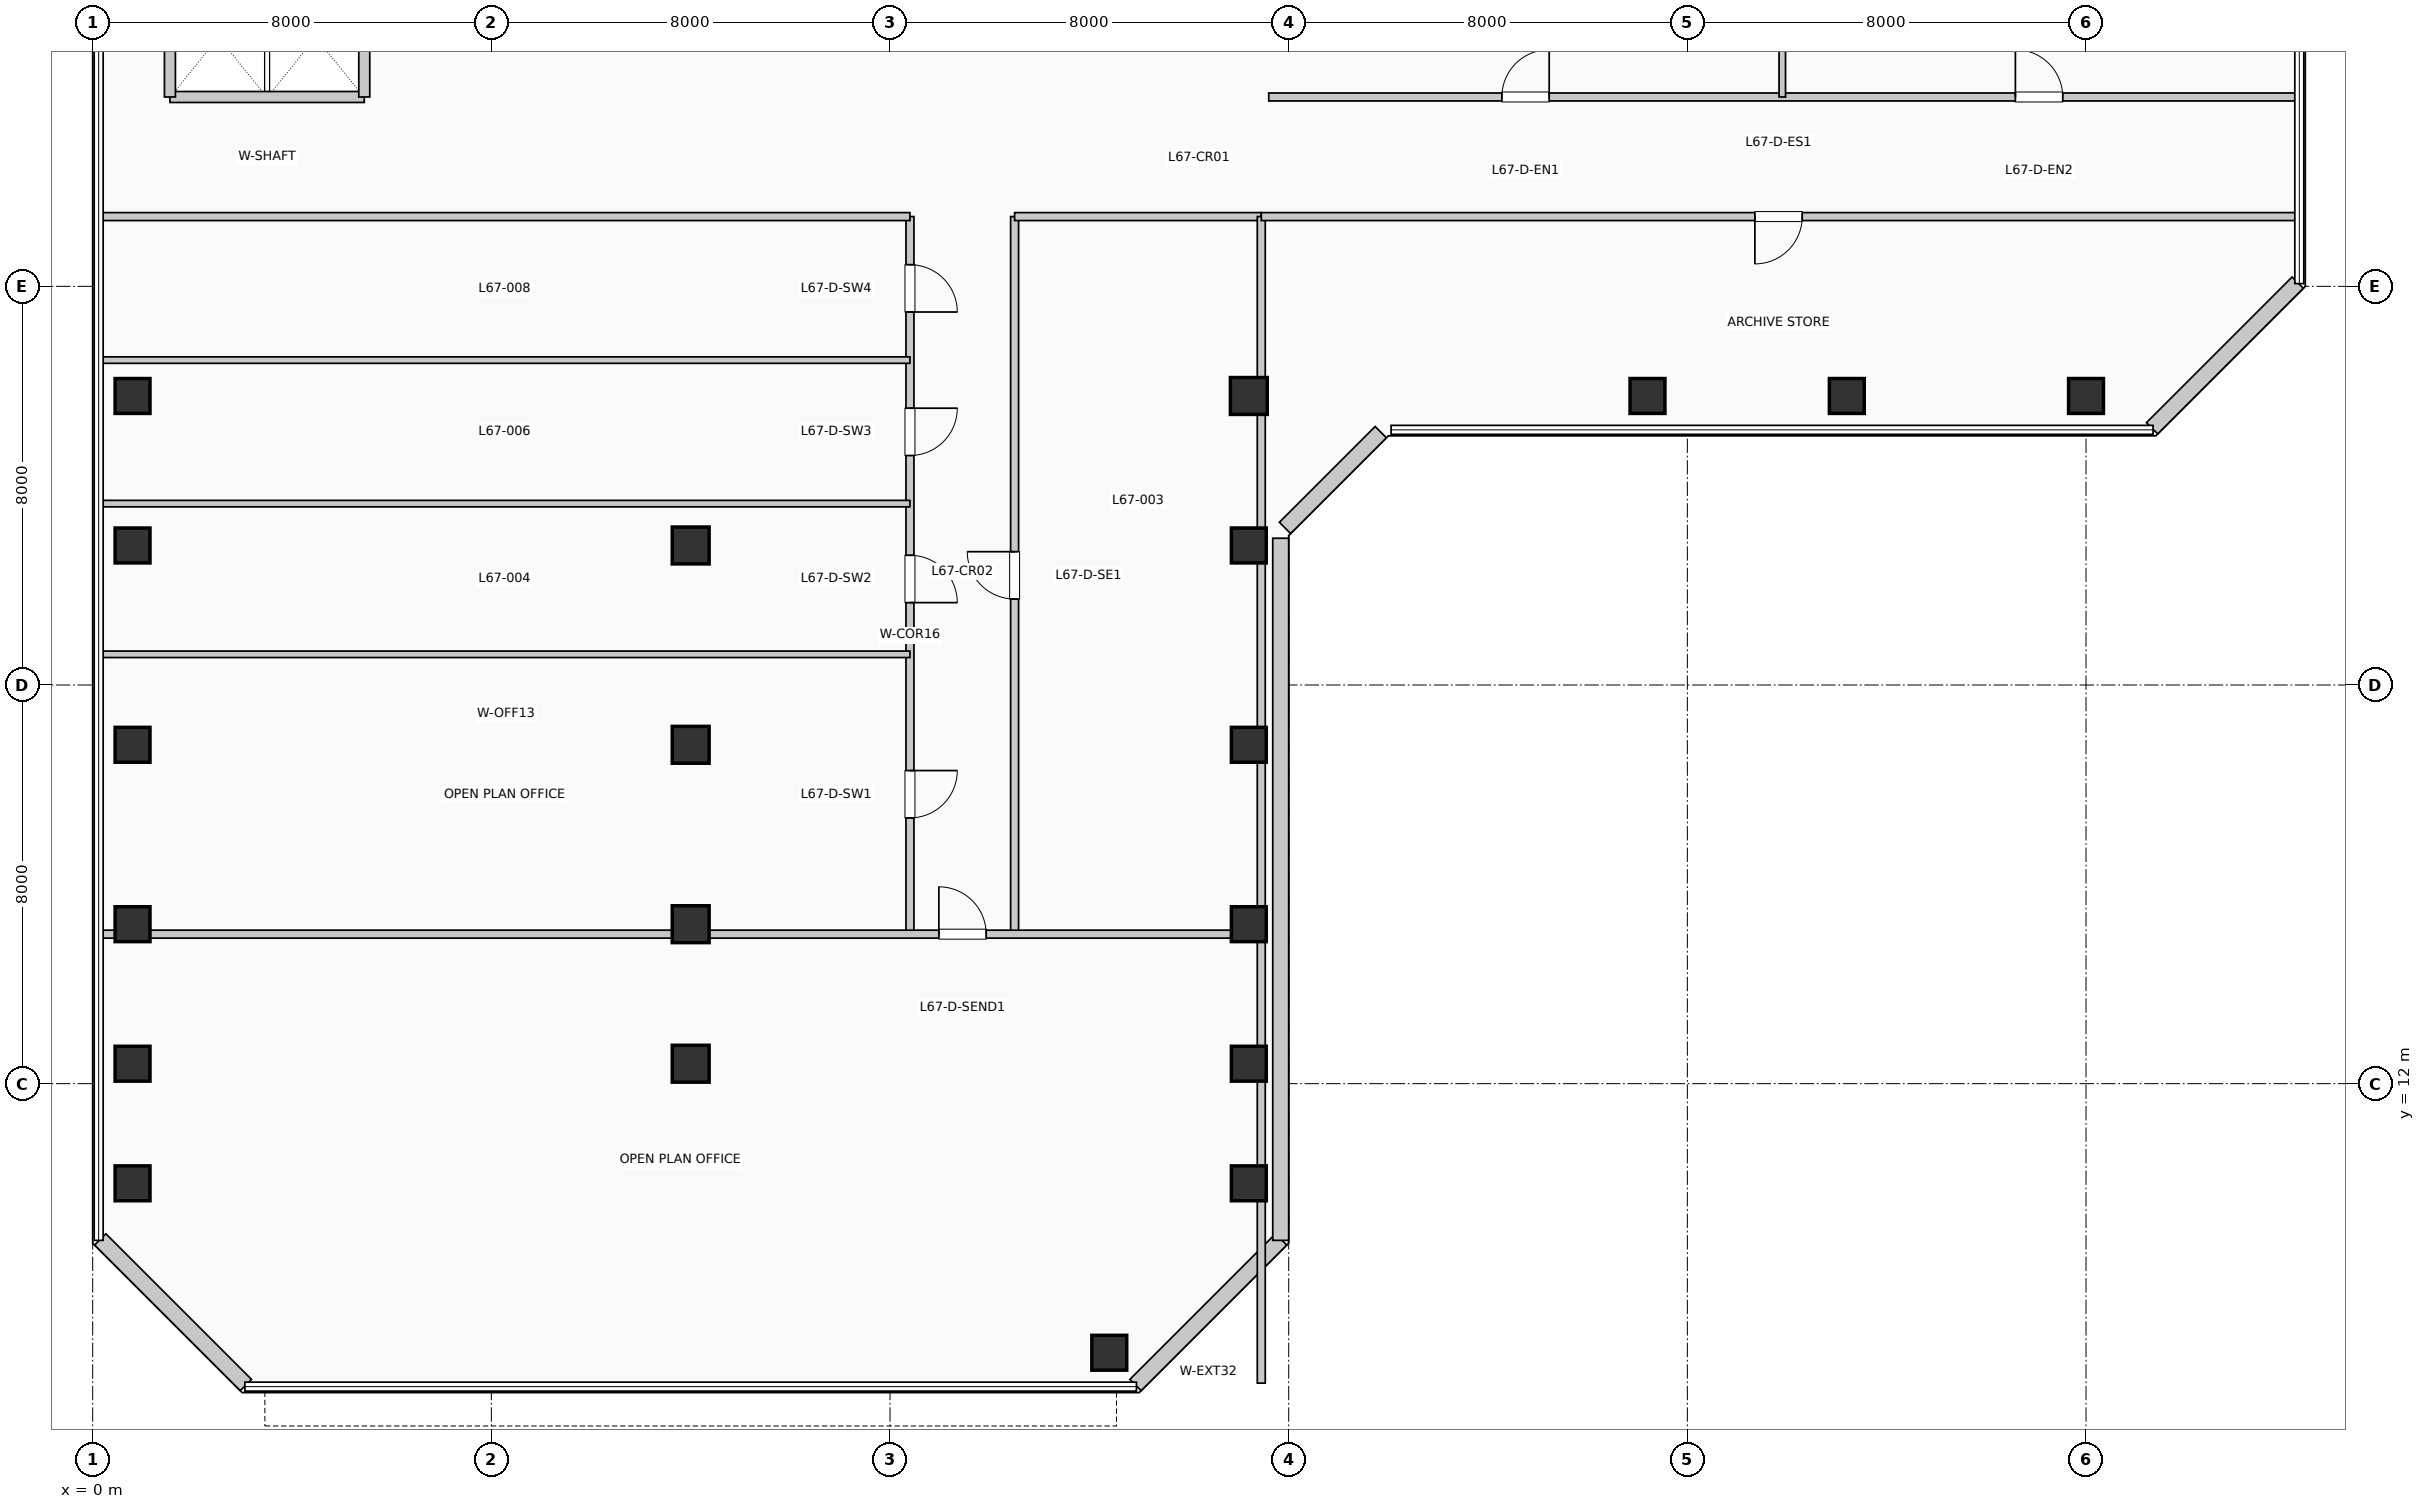
"""IFC4 building model, lengths in metres.
Left out: names, types, materials, properties, quantities, classifications, styles, units other than length and angle.
Written with IfcOpenShell. Run it as: python <this file> out.ifc"""

import sys

from ifc_helpers import new_model, si_unit, direction, frame, frame_2d, origin, origin_2d, place, context, subcontext, project, spatial, rectangle, extrude, element, fill, save


model = new_model("IFC4")
c1 = context("Model", 3, precision=1e-05, world=origin(), true_north=direction((0.0, 1.0)))
c2 = subcontext(c1, "Body", "Model", "MODEL_VIEW")
j1 = project(units=[si_unit("LENGTHUNIT", "METRE"), si_unit("PLANEANGLEUNIT", "RADIAN")], contexts=[c1])
p1 = place(None, origin())
s1 = spatial("IfcSite", under=j1, at=p1, CompositionType="ELEMENT")
p2 = place(p1, origin())
s2 = spatial("IfcBuilding", under=s1, at=p2, CompositionType="ELEMENT")
p3 = place(p2, frame((0.0, 0.0, 276.21)))
s3 = spatial("IfcBuildingStorey", under=s2, at=p3, CompositionType="ELEMENT", Elevation=276.21)
for number, where, z_axis, x_axis in (
    (1, (0.8, 10.0, 0.0), (0.0, 0.0, 1.0), (1.0, 0.0, 0.0)),
    (2, (0.8, 12.4, 0.0), (0.0, 0.0, 1.0), (1.0, 0.0, 0.0)),
    (3, (0.8, 15.2, 0.0), (0.0, 0.0, 1.0), (1.0, 0.0, 0.0)),
    (4, (0.8, 18.8, 0.0), (0.0, 0.0, 1.0), (1.0, 0.0, 0.0)),
    (5, (0.8, 22.8, 0.0), (0.0, 0.0, 1.0), (1.0, 0.0, 0.0)),
    (6, (0.8, 25.8, 0.0), (0.0, 0.0, 1.0), (1.0, 0.0, 0.0)),
):
    element("IfcColumn", number, at=place(p3, frame(where, z_axis=z_axis, x_axis=x_axis)), inside=s3, PredefinedType="COLUMN", context=c2, shape_type="SweptSolid", body=[
        extrude(rectangle(XDim=0.7, YDim=0.7, at=origin_2d()), origin(), (0.0, 0.0, 1.0), 3.96),
    ])
for number, where, z_axis, x_axis in (
    (7, (12.0, 12.4, 0.0), (0.0, 0.0, 1.0), (1.0, 0.0, 0.0)),
    (8, (12.0, 15.2, 0.0), (0.0, 0.0, 1.0), (1.0, 0.0, 0.0)),
    (9, (12.0, 18.8, 0.0), (0.0, 0.0, 1.0), (1.0, 0.0, 0.0)),
    (10, (12.0, 22.8, 0.0), (0.0, 0.0, 1.0), (1.0, 0.0, 0.0)),
):
    element("IfcColumn", number, at=place(p3, frame(where, z_axis=z_axis, x_axis=x_axis)), inside=s3, PredefinedType="COLUMN", context=c2, shape_type="SweptSolid", body=[
        extrude(rectangle(XDim=0.74, YDim=0.74, at=origin_2d()), origin(), (0.0, 0.0, 1.0), 3.96),
    ])
for number, where, z_axis, x_axis in (
    (11, (20.4, 6.6, 0.0), (0.0, 0.0, 1.0), (1.0, 0.0, 0.0)),
    (12, (23.2, 10.0, 0.0), (0.0, 0.0, 1.0), (1.0, 0.0, 0.0)),
    (13, (23.2, 12.4, 0.0), (0.0, 0.0, 1.0), (1.0, 0.0, 0.0)),
    (14, (23.2, 15.2, 0.0), (0.0, 0.0, 1.0), (1.0, 0.0, 0.0)),
    (15, (23.2, 18.8, 0.0), (0.0, 0.0, 1.0), (1.0, 0.0, 0.0)),
    (16, (23.2, 22.8, 0.0), (0.0, 0.0, 1.0), (1.0, 0.0, 0.0)),
):
    element("IfcColumn", number, at=place(p3, frame(where, z_axis=z_axis, x_axis=x_axis)), inside=s3, PredefinedType="COLUMN", context=c2, shape_type="SweptSolid", body=[
        extrude(rectangle(XDim=0.7, YDim=0.7, at=origin_2d()), origin(), (0.0, 0.0, 1.0), 3.96),
    ])
p4 = place(p3, frame((23.2, 25.8, 0.0), z_axis=(0.0, 0.0, 1.0), x_axis=(1.0, 0.0, 0.0)))
e17 = element("IfcColumn", 17, at=p4, inside=s3, PredefinedType="COLUMN", context=c2, shape_type="SweptSolid", body=[
    extrude(rectangle(XDim=0.74, YDim=0.74, at=origin_2d()), origin(), (0.0, 0.0, 1.0), 3.96),
])
for number, where, z_axis, x_axis in (
    (18, (31.2, 25.8, 0.0), (0.0, 0.0, 1.0), (1.0, 0.0, 0.0)),
    (19, (35.2, 25.8, 0.0), (0.0, 0.0, 1.0), (1.0, 0.0, 0.0)),
    (20, (40.0, 25.8, 0.0), (0.0, 0.0, 1.0), (1.0, 0.0, 0.0)),
):
    element("IfcColumn", number, at=place(p3, frame(where, z_axis=z_axis, x_axis=x_axis)), inside=s3, PredefinedType="COLUMN", context=c2, shape_type="SweptSolid", body=[
        extrude(rectangle(XDim=0.7, YDim=0.7, at=origin_2d()), origin(), (0.0, 0.0, 1.0), 3.96),
    ])
p5 = place(p3, frame((20.926, 5.952, 0.0), z_axis=(0.0, 0.0, 1.0), x_axis=(0.707077242712, 0.707136318428, 0.0)))
e21 = element("IfcWall", 21, at=p5, inside=s3, PredefinedType="SOLIDWALL", context=c2, shape_type="SweptSolid", body=[
    extrude(rectangle(XDim=4.133, YDim=0.32, at=frame_2d((2.066, 0.0))), origin(), (0.0, 0.0, 1.0), 3.74),
])
p6 = place(p3, frame((23.84, 8.855, 0.0), z_axis=(0.0, 0.0, 1.0), x_axis=(0.0, 1.0, 0.0)))
e22 = element("IfcWall", 22, at=p6, inside=s3, PredefinedType="SOLIDWALL", context=c2, shape_type="SweptSolid", body=[
    extrude(rectangle(XDim=14.09, YDim=0.32, at=frame_2d((7.045, 0.0))), origin(), (0.0, 0.0, 1.0), 3.74),
])
p7 = place(p3, frame((23.926, 23.152, 0.0), z_axis=(0.0, 0.0, 1.0), x_axis=(0.707106781187, 0.707106781187, 0.0)))
e23 = element("IfcWall", 23, at=p7, inside=s3, PredefinedType="SOLIDWALL", context=c2, shape_type="SweptSolid", body=[
    extrude(rectangle(XDim=2.718, YDim=0.32, at=frame_2d((1.359, 0.0))), origin(), (0.0, 0.0, 1.0), 3.74),
])
for number, where, z_axis, x_axis in (
    (24, (41.326, 25.152, 0.0), (0.0, 0.0, 1.0), (0.707, 0.707, 0.0)),
    (25, (0.152, 8.874, 0.0), (0.0, 0.0, 1.0), (0.707, -0.707, 0.0)),
):
    element("IfcWall", number, at=place(p3, frame(where, z_axis=z_axis, x_axis=x_axis)), inside=s3, PredefinedType="SOLIDWALL", context=c2, shape_type="SweptSolid", body=[
        extrude(rectangle(XDim=4.133, YDim=0.32, at=frame_2d((2.066, 0.0))), origin(), (0.0, 0.0, 1.0), 3.74),
    ])
p8 = place(p3, frame((1.55, 31.8, 0.0), z_axis=(0.0, 0.0, 1.0), x_axis=(1.0, 0.0, 0.0)))
e26 = element("IfcWall", 26, at=p8, inside=s3, PredefinedType="PARTITIONING", context=c2, shape_type="SweptSolid", body=[
    extrude(rectangle(XDim=3.9, YDim=0.22, at=frame_2d((1.95, 0.0))), origin(), (0.0, 0.0, 1.0), 3.74),
])
for number, where, z_axis, x_axis in (
    (27, (1.55, 31.8, 0.0), (0.0, 0.0, 1.0), (0.0, 1.0, 0.0)),
    (28, (5.45, 31.8, 0.0), (0.0, 0.0, 1.0), (0.0, 1.0, 0.0)),
):
    element("IfcWall", number, at=place(p3, frame(where, z_axis=z_axis, x_axis=x_axis)), inside=s3, PredefinedType="PARTITIONING", context=c2, shape_type="SweptSolid", body=[
        extrude(rectangle(XDim=2.38, YDim=0.22, at=frame_2d((1.19, 0.0))), origin(), (0.0, 0.0, 1.0), 3.74),
    ])
p9 = place(p3, frame((16.4, 15.0, 0.0), z_axis=(0.0, 0.0, 1.0), x_axis=(0.0, 1.0, 0.0)))
e29 = element("IfcWall", 29, at=p9, inside=s3, PredefinedType="PARTITIONING", context=c2, shape_type="SweptSolid", body=[
    extrude(rectangle(XDim=14.4, YDim=0.16, at=frame_2d((7.2, 0.0))), origin(), (0.0, 0.0, 1.0), 3.74),
])
p10 = place(p9, frame((3.283, 0.0, 0.0), z_axis=(0.0, 0.0, 1.0), x_axis=(-1.0, 0.0, 0.0)))
e30 = element("IfcOpeningElement", 30, at=p10, cuts=e29, PredefinedType="OPENING", context=c2, shape_type="SweptSolid", body=[
    extrude(rectangle(XDim=0.95, YDim=2.15, at=frame_2d((0.475, 1.075))), frame((0.0, 0.09, 0.0), z_axis=(0.0, -1.0, 0.0), x_axis=(1.0, 0.0, 0.0)), (0.0, 0.0, 1.0), 0.18),
])
p11 = place(p9, frame((7.603, 0.0, 0.0), z_axis=(0.0, 0.0, 1.0), x_axis=(-1.0, 0.0, 0.0)))
e31 = element("IfcOpeningElement", 31, at=p11, cuts=e29, PredefinedType="OPENING", context=c2, shape_type="SweptSolid", body=[
    extrude(rectangle(XDim=0.95, YDim=2.15, at=frame_2d((0.475, 1.075))), frame((0.0, 0.09, 0.0), z_axis=(0.0, -1.0, 0.0), x_axis=(1.0, 0.0, 0.0)), (0.0, 0.0, 1.0), 0.18),
])
p12 = place(p9, frame((10.555, 0.0, 0.0), z_axis=(0.0, 0.0, 1.0), x_axis=(-1.0, 0.0, 0.0)))
e32 = element("IfcOpeningElement", 32, at=p12, cuts=e29, PredefinedType="OPENING", context=c2, shape_type="SweptSolid", body=[
    extrude(rectangle(XDim=0.95, YDim=2.15, at=frame_2d((0.475, 1.075))), frame((0.0, 0.09, 0.0), z_axis=(0.0, -1.0, 0.0), x_axis=(1.0, 0.0, 0.0)), (0.0, 0.0, 1.0), 0.18),
])
p13 = place(p9, frame((13.435, 0.0, 0.0), z_axis=(0.0, 0.0, 1.0), x_axis=(-1.0, 0.0, 0.0)))
e33 = element("IfcOpeningElement", 33, at=p13, cuts=e29, PredefinedType="OPENING", context=c2, shape_type="SweptSolid", body=[
    extrude(rectangle(XDim=0.95, YDim=2.15, at=frame_2d((0.475, 1.075))), frame((0.0, 0.09, 0.0), z_axis=(0.0, -1.0, 0.0), x_axis=(1.0, 0.0, 0.0)), (0.0, 0.0, 1.0), 0.18),
])
p14 = place(p3, frame((18.5, 15.0, 0.0), z_axis=(0.0, 0.0, 1.0), x_axis=(0.0, 1.0, 0.0)))
e34 = element("IfcWall", 34, at=p14, inside=s3, PredefinedType="PARTITIONING", context=c2, shape_type="SweptSolid", body=[
    extrude(rectangle(XDim=14.4, YDim=0.16, at=frame_2d((7.2, 0.0))), origin(), (0.0, 0.0, 1.0), 3.74),
])
p15 = place(p14, frame((6.725, 0.0, 0.0)))
e35 = element("IfcOpeningElement", 35, at=p15, cuts=e34, PredefinedType="OPENING", context=c2, shape_type="SweptSolid", body=[
    extrude(rectangle(XDim=0.95, YDim=2.15, at=frame_2d((0.475, 1.075))), frame((0.0, 0.09, 0.0), z_axis=(0.0, -1.0, 0.0), x_axis=(1.0, 0.0, 0.0)), (0.0, 0.0, 1.0), 0.18),
])
p16 = place(p3, frame((0.19, 15.0, 0.0), z_axis=(0.0, 0.0, 1.0), x_axis=(1.0, 0.0, 0.0)))
e36 = element("IfcWall", 36, at=p16, inside=s3, PredefinedType="PARTITIONING", context=c2, shape_type="SweptSolid", body=[
    extrude(rectangle(XDim=23.26, YDim=0.16, at=frame_2d((11.63, 0.0))), origin(), (0.0, 0.0, 1.0), 3.175),
])
p17 = place(p16, frame((16.79, 0.0, 0.0)))
e37 = element("IfcOpeningElement", 37, at=p17, cuts=e36, PredefinedType="OPENING", context=c2, shape_type="SweptSolid", body=[
    extrude(rectangle(XDim=0.95, YDim=2.15, at=frame_2d((0.475, 1.075))), frame((0.0, 0.09, 0.0), z_axis=(0.0, -1.0, 0.0), x_axis=(1.0, 0.0, 0.0)), (0.0, 0.0, 1.0), 0.18),
])
p18 = place(p3, frame((0.19, 29.4, 0.0), z_axis=(0.0, 0.0, 1.0), x_axis=(1.0, 0.0, 0.0)))
e38 = element("IfcWall", 38, at=p18, inside=s3, PredefinedType="PARTITIONING", context=c2, shape_type="SweptSolid", body=[
    extrude(rectangle(XDim=16.21, YDim=0.16, at=frame_2d((8.105, 0.0))), origin(), (0.0, 0.0, 1.0), 3.425),
])
p19 = place(p3, frame((18.5, 29.4, 0.0), z_axis=(0.0, 0.0, 1.0), x_axis=(1.0, 0.0, 0.0)))
e39 = element("IfcWall", 39, at=p19, inside=s3, PredefinedType="PARTITIONING", context=c2, shape_type="SweptSolid", body=[
    extrude(rectangle(XDim=4.95, YDim=0.16, at=frame_2d((2.475, 0.0))), origin(), (0.0, 0.0, 1.0), 3.425),
])
p20 = place(p3, frame((23.45, 5.99, 0.0), z_axis=(0.0, 0.0, 1.0), x_axis=(0.0, 1.0, 0.0)))
e40 = element("IfcWall", 40, at=p20, inside=s3, PredefinedType="PARTITIONING", context=c2, shape_type="SweptSolid", body=[
    extrude(rectangle(XDim=23.41, YDim=0.16, at=frame_2d((11.705, 0.0))), origin(), (0.0, 0.0, 1.0), 3.175),
])
for number, where, z_axis, x_axis in (
    (41, (0.19, 20.616, 0.0), (0.0, 0.0, 1.0), (1.0, 0.0, 0.0)),
    (42, (0.19, 23.64, 0.0), (0.0, 0.0, 1.0), (1.0, 0.0, 0.0)),
    (43, (0.19, 26.52, 0.0), (0.0, 0.0, 1.0), (1.0, 0.0, 0.0)),
):
    element("IfcWall", number, at=place(p3, frame(where, z_axis=z_axis, x_axis=x_axis)), inside=s3, PredefinedType="PARTITIONING", context=c2, shape_type="SweptSolid", body=[
        extrude(rectangle(XDim=16.21, YDim=0.13, at=frame_2d((8.105, 0.0))), origin(), (0.0, 0.0, 1.0), 3.74),
    ])
p21 = place(p3, frame((23.45, 29.4, 0.0), z_axis=(0.0, 0.0, 1.0), x_axis=(1.0, 0.0, 0.0)))
e44 = element("IfcWall", 44, at=p21, inside=s3, PredefinedType="PARTITIONING", context=c2, shape_type="SweptSolid", body=[
    extrude(rectangle(XDim=20.76, YDim=0.16, at=frame_2d((10.38, 0.0))), origin(), (0.0, 0.0, 1.0), 3.425),
])
p22 = place(p21, frame((10.855, 0.0, 0.0), z_axis=(0.0, 0.0, 1.0), x_axis=(-1.0, 0.0, 0.0)))
e45 = element("IfcOpeningElement", 45, at=p22, cuts=e44, PredefinedType="OPENING", context=c2, shape_type="SweptSolid", body=[
    extrude(rectangle(XDim=0.95, YDim=2.15, at=frame_2d((0.475, 1.075))), frame((0.0, 0.09, 0.0), z_axis=(0.0, -1.0, 0.0), x_axis=(1.0, 0.0, 0.0)), (0.0, 0.0, 1.0), 0.18),
])
p23 = place(p3, frame((23.6, 31.8, 0.0), z_axis=(0.0, 0.0, 1.0), x_axis=(1.0, 0.0, 0.0)))
e46 = element("IfcWall", 46, at=p23, inside=s3, PredefinedType="PARTITIONING", context=c2, shape_type="SweptSolid", body=[
    extrude(rectangle(XDim=20.61, YDim=0.16, at=frame_2d((10.305, 0.0))), origin(), (0.0, 0.0, 1.0), 3.74),
])
p24 = place(p23, frame((4.677, 0.0, 0.0)))
e47 = element("IfcOpeningElement", 47, at=p24, cuts=e46, PredefinedType="OPENING", context=c2, shape_type="SweptSolid", body=[
    extrude(rectangle(XDim=0.95, YDim=2.15, at=frame_2d((0.475, 1.075))), frame((0.0, 0.09, 0.0), z_axis=(0.0, -1.0, 0.0), x_axis=(1.0, 0.0, 0.0)), (0.0, 0.0, 1.0), 0.18),
])
p25 = place(p23, frame((14.982, 0.0, 0.0)))
e48 = element("IfcOpeningElement", 48, at=p25, cuts=e46, PredefinedType="OPENING", context=c2, shape_type="SweptSolid", body=[
    extrude(rectangle(XDim=0.95, YDim=2.15, at=frame_2d((0.475, 1.075))), frame((0.0, 0.09, 0.0), z_axis=(0.0, -1.0, 0.0), x_axis=(1.0, 0.0, 0.0)), (0.0, 0.0, 1.0), 0.18),
])
p26 = place(p3, frame((33.905, 31.8, 0.0), z_axis=(0.0, 0.0, 1.0), x_axis=(0.0, 1.0, 0.0)))
e49 = element("IfcWall", 49, at=p26, inside=s3, PredefinedType="PARTITIONING", context=c2, shape_type="SweptSolid", body=[
    extrude(rectangle(XDim=14.01, YDim=0.13, at=frame_2d((7.005, 0.0))), origin(), (0.0, 0.0, 1.0), 3.74),
])
p27 = place(p17, origin())
e50 = element("IfcDoor", 50, at=p27, inside=s3, OperationType="SINGLE_SWING_LEFT", PredefinedType="DOOR", context=c2, shape_type="SweptSolid", body=[
    extrude(rectangle(XDim=0.95, YDim=2.15, at=frame_2d((0.475, 1.075))), frame((0.0, 0.025, 0.0), z_axis=(0.0, -1.0, 0.0), x_axis=(1.0, 0.0, 0.0)), (0.0, 0.0, 1.0), 0.05),
])
fill(e37, e50)
p28 = place(p10, origin())
e51 = element("IfcDoor", 51, at=p28, inside=s3, OperationType="SINGLE_SWING_RIGHT", PredefinedType="DOOR", context=c2, shape_type="SweptSolid", body=[
    extrude(rectangle(XDim=0.95, YDim=2.15, at=frame_2d((0.475, 1.075))), frame((0.0, 0.025, 0.0), z_axis=(0.0, -1.0, 0.0), x_axis=(1.0, 0.0, 0.0)), (0.0, 0.0, 1.0), 0.05),
])
fill(e30, e51)
p29 = place(p11, origin())
e52 = element("IfcDoor", 52, at=p29, inside=s3, OperationType="SINGLE_SWING_LEFT", PredefinedType="DOOR", context=c2, shape_type="SweptSolid", body=[
    extrude(rectangle(XDim=0.95, YDim=2.15, at=frame_2d((0.475, 1.075))), frame((0.0, 0.025, 0.0), z_axis=(0.0, -1.0, 0.0), x_axis=(1.0, 0.0, 0.0)), (0.0, 0.0, 1.0), 0.05),
])
fill(e31, e52)
p30 = place(p12, origin())
e53 = element("IfcDoor", 53, at=p30, inside=s3, OperationType="SINGLE_SWING_RIGHT", PredefinedType="DOOR", context=c2, shape_type="SweptSolid", body=[
    extrude(rectangle(XDim=0.95, YDim=2.15, at=frame_2d((0.475, 1.075))), frame((0.0, 0.025, 0.0), z_axis=(0.0, -1.0, 0.0), x_axis=(1.0, 0.0, 0.0)), (0.0, 0.0, 1.0), 0.05),
])
fill(e32, e53)
p31 = place(p13, origin())
e54 = element("IfcDoor", 54, at=p31, inside=s3, OperationType="SINGLE_SWING_LEFT", PredefinedType="DOOR", context=c2, shape_type="SweptSolid", body=[
    extrude(rectangle(XDim=0.95, YDim=2.15, at=frame_2d((0.475, 1.075))), frame((0.0, 0.025, 0.0), z_axis=(0.0, -1.0, 0.0), x_axis=(1.0, 0.0, 0.0)), (0.0, 0.0, 1.0), 0.05),
])
fill(e33, e54)
p32 = place(p15, origin())
e55 = element("IfcDoor", 55, at=p32, inside=s3, OperationType="SINGLE_SWING_RIGHT", PredefinedType="DOOR", context=c2, shape_type="SweptSolid", body=[
    extrude(rectangle(XDim=0.95, YDim=2.15, at=frame_2d((0.475, 1.075))), frame((0.0, 0.025, 0.0), z_axis=(0.0, -1.0, 0.0), x_axis=(1.0, 0.0, 0.0)), (0.0, 0.0, 1.0), 0.05),
])
fill(e35, e55)
p33 = place(p22, origin())
e56 = element("IfcDoor", 56, at=p33, inside=s3, OperationType="SINGLE_SWING_LEFT", PredefinedType="DOOR", context=c2, shape_type="SweptSolid", body=[
    extrude(rectangle(XDim=0.95, YDim=2.15, at=frame_2d((0.475, 1.075))), frame((0.0, 0.025, 0.0), z_axis=(0.0, -1.0, 0.0), x_axis=(1.0, 0.0, 0.0)), (0.0, 0.0, 1.0), 0.05),
])
fill(e45, e56)
p34 = place(p24, origin())
e57 = element("IfcDoor", 57, at=p34, inside=s3, OperationType="SINGLE_SWING_RIGHT", PredefinedType="DOOR", context=c2, shape_type="SweptSolid", body=[
    extrude(rectangle(XDim=0.95, YDim=2.15, at=frame_2d((0.475, 1.075))), frame((0.0, 0.025, 0.0), z_axis=(0.0, -1.0, 0.0), x_axis=(1.0, 0.0, 0.0)), (0.0, 0.0, 1.0), 0.05),
])
fill(e47, e57)
p35 = place(p25, origin())
e58 = element("IfcDoor", 58, at=p35, inside=s3, OperationType="SINGLE_SWING_LEFT", PredefinedType="DOOR", context=c2, shape_type="SweptSolid", body=[
    extrude(rectangle(XDim=0.95, YDim=2.15, at=frame_2d((0.475, 1.075))), frame((0.0, 0.025, 0.0), z_axis=(0.0, -1.0, 0.0), x_axis=(1.0, 0.0, 0.0)), (0.0, 0.0, 1.0), 0.05),
])
fill(e48, e58)
save(model, sys.argv[1])
